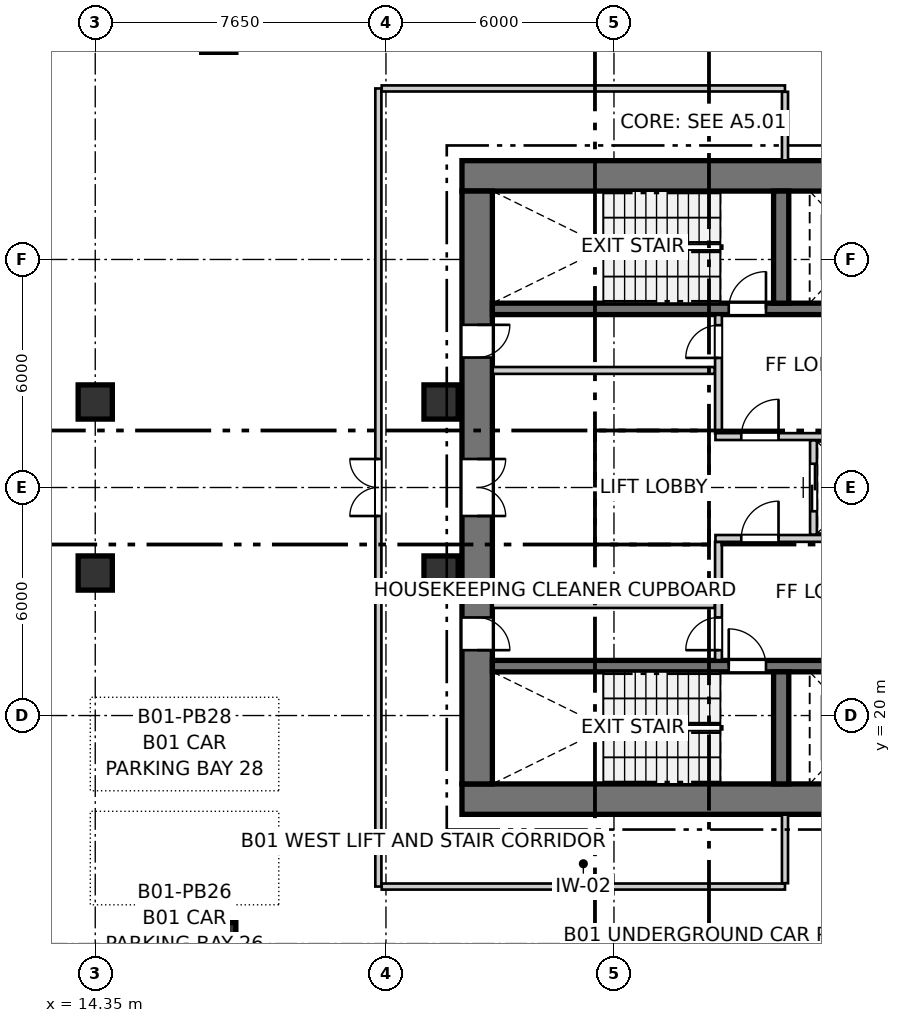
"""IFC4 building model, lengths in metres.
Left out: names, types, materials, properties, quantities, classifications, styles, units other than length and angle.
Written with IfcOpenShell. Run it as: python <this file> out.ifc"""

import sys

from ifc_helpers import new_model, si_unit, direction, frame, frame_2d, origin, origin_2d, place, context, subcontext, project, spatial, rectangle, extrude, source, transform, mapped, element, fill, save


model = new_model("IFC4")
c1 = context("Model", 3, precision=1e-05, world=origin(), true_north=direction((0.0, 1.0)))
c2 = subcontext(c1, "Body", "Model", "MODEL_VIEW")
j1 = project(units=[si_unit("LENGTHUNIT", "METRE"), si_unit("PLANEANGLEUNIT", "RADIAN")], contexts=[c1])
p1 = place(None, origin())
s1 = spatial("IfcSite", under=j1, at=p1, CompositionType="ELEMENT")
p2 = place(p1, origin())
s2 = spatial("IfcBuilding", under=s1, at=p2, CompositionType="ELEMENT")
p3 = place(p2, frame((0.0, 0.0, -4.2)))
s3 = spatial("IfcBuildingStorey", under=s2, at=p3, CompositionType="ELEMENT", Elevation=-4.2)
m1 = source(origin(), c2, "Body", "SweptSolid", [
    extrude(rectangle(XDim=0.9, YDim=0.9, at=origin_2d()), origin(), (0.0, 0.0, 1.0), 3.985),
])
p4 = place(p3, frame((14.35, 23.75, 0.0), z_axis=(0.0, 0.0, 1.0), x_axis=(1.0, 0.0, 0.0)))
e1 = element("IfcColumn", 1, at=p4, inside=s3, PredefinedType="COLUMN", context=c2, shape_type="MappedRepresentation", body=[
    mapped(m1, transform((0.0, 0.0, 0.0), x_axis=(1.0, 0.0, 0.0), y_axis=(0.0, 1.0, 0.0), z_axis=(0.0, 0.0, 1.0), scale=1.0)),
])
m2 = source(origin(), c2, "Body", "SweptSolid", [
    extrude(rectangle(XDim=0.9, YDim=0.9, at=origin_2d()), origin(), (0.0, 0.0, 1.0), 3.9),
])
p5 = place(p3, frame((23.45, 23.75, 0.0), z_axis=(0.0, 0.0, 1.0), x_axis=(1.0, 0.0, 0.0)))
e2 = element("IfcColumn", 2, at=p5, inside=s3, PredefinedType="COLUMN", context=c2, shape_type="MappedRepresentation", body=[
    mapped(m2, transform((0.0, 0.0, 0.0), x_axis=(1.0, 0.0, 0.0), y_axis=(0.0, 1.0, 0.0), z_axis=(0.0, 0.0, 1.0), scale=1.0)),
])
p6 = place(p3, frame((14.35, 28.25, 0.0), z_axis=(0.0, 0.0, 1.0), x_axis=(1.0, 0.0, 0.0)))
e3 = element("IfcColumn", 3, at=p6, inside=s3, PredefinedType="COLUMN", context=c2, shape_type="MappedRepresentation", body=[
    mapped(m1, transform((0.0, 0.0, 0.0), x_axis=(1.0, 0.0, 0.0), y_axis=(0.0, 1.0, 0.0), z_axis=(0.0, 0.0, 1.0), scale=1.0)),
])
for number, where, z_axis, x_axis in (
    (4, (23.45, 28.25, 0.0), (0.0, 0.0, 1.0), (1.0, 0.0, 0.0)),
    (5, (17.6, 14.1, 0.0), (0.0, 0.0, 1.0), (1.0, 0.0, 0.0)),
    (6, (17.6, 37.9, 0.0), (0.0, 0.0, 1.0), (1.0, 0.0, 0.0)),
):
    element("IfcColumn", number, at=place(p3, frame(where, z_axis=z_axis, x_axis=x_axis)), inside=s3, PredefinedType="COLUMN", context=c2, shape_type="MappedRepresentation", body=[
        mapped(m2, transform((0.0, 0.0, 0.0), x_axis=(1.0, 0.0, 0.0), y_axis=(0.0, 1.0, 0.0), z_axis=(0.0, 0.0, 1.0), scale=1.0)),
    ])
for number, where, z_axis, x_axis in (
    (7, (24.0, 17.8, 0.0), (0.0, 0.0, 1.0), (1.0, 0.0, 0.0)),
    (8, (36.7, 34.2, 0.0), (0.0, 0.0, 1.0), (-1.0, 0.0, 0.0)),
):
    element("IfcWall", number, at=place(p3, frame(where, z_axis=z_axis, x_axis=x_axis)), inside=s3, PredefinedType="SHEAR", context=c2, shape_type="SweptSolid", body=[
        extrude(rectangle(XDim=12.7, YDim=0.8, at=frame_2d((6.35, 0.0))), origin(), (0.0, 0.0, 1.0), 3.9),
    ])
p7 = place(p3, frame((24.4, 33.8, 0.0), z_axis=(0.0, 0.0, 1.0), x_axis=(0.0, -1.0, 0.0)))
e9 = element("IfcWall", 9, at=p7, inside=s3, PredefinedType="SHEAR", context=c2, shape_type="SweptSolid", body=[
    extrude(rectangle(XDim=15.6, YDim=0.8, at=frame_2d((7.8, 0.0))), origin(), (0.0, 0.0, 1.0), 3.9),
])
p8 = place(p7, frame((7.05, 0.0, 0.0)))
e10 = element("IfcOpeningElement", 10, at=p8, cuts=e9, PredefinedType="OPENING", context=c2, shape_type="SweptSolid", body=[
    extrude(rectangle(XDim=1.5, YDim=2.15, at=frame_2d((0.75, 1.075))), frame((0.0, 0.41, 0.0), z_axis=(0.0, -1.0, 0.0), x_axis=(1.0, 0.0, 0.0)), (0.0, 0.0, 1.0), 0.82),
])
p9 = place(p7, frame((3.52, 0.0, 0.0)))
e11 = element("IfcOpeningElement", 11, at=p9, cuts=e9, PredefinedType="OPENING", context=c2, shape_type="SweptSolid", body=[
    extrude(rectangle(XDim=0.86, YDim=2.05, at=frame_2d((0.43, 1.025))), frame((0.0, 0.41, 0.0), z_axis=(0.0, -1.0, 0.0), x_axis=(1.0, 0.0, 0.0)), (0.0, 0.0, 1.0), 0.82),
])
p10 = place(p7, frame((11.22, 0.0, 0.0)))
e12 = element("IfcOpeningElement", 12, at=p10, cuts=e9, PredefinedType="OPENING", context=c2, shape_type="SweptSolid", body=[
    extrude(rectangle(XDim=0.86, YDim=2.05, at=frame_2d((0.43, 1.025))), frame((0.0, 0.41, 0.0), z_axis=(0.0, -1.0, 0.0), x_axis=(1.0, 0.0, 0.0)), (0.0, 0.0, 1.0), 0.82),
])
p11 = place(p3, frame((24.8, 21.3, 0.0), z_axis=(0.0, 0.0, 1.0), x_axis=(1.0, 0.0, 0.0)))
e13 = element("IfcWall", 13, at=p11, inside=s3, PredefinedType="SHEAR", context=c2, shape_type="SweptSolid", body=[
    extrude(rectangle(XDim=11.1, YDim=0.3, at=frame_2d((5.55, 0.0))), origin(), (0.0, 0.0, 1.0), 3.9),
])
p12 = place(p11, frame((6.22, 0.0, 0.0)))
e14 = element("IfcOpeningElement", 14, at=p12, cuts=e13, PredefinedType="OPENING", context=c2, shape_type="SweptSolid", body=[
    extrude(rectangle(XDim=0.98, YDim=2.15, at=frame_2d((0.49, 1.075))), frame((0.0, 0.16, 0.0), z_axis=(0.0, -1.0, 0.0), x_axis=(1.0, 0.0, 0.0)), (0.0, 0.0, 1.0), 0.32),
])
p13 = place(p11, frame((9.15, 0.0, 0.0)))
e15 = element("IfcOpeningElement", 15, at=p13, cuts=e13, PredefinedType="OPENING", context=c2, shape_type="SweptSolid", body=[
    extrude(rectangle(XDim=1.15, YDim=2.15, at=frame_2d((0.575, 1.075))), frame((0.0, 0.16, 0.0), z_axis=(0.0, -1.0, 0.0), x_axis=(1.0, 0.0, 0.0)), (0.0, 0.0, 1.0), 0.32),
])
p14 = place(p3, frame((32.4, 18.2, 0.0), z_axis=(0.0, 0.0, 1.0), x_axis=(0.0, 1.0, 0.0)))
e16 = element("IfcWall", 16, at=p14, inside=s3, PredefinedType="SHEAR", context=c2, shape_type="SweptSolid", body=[
    extrude(rectangle(XDim=2.95, YDim=0.4, at=frame_2d((1.475, 0.0))), origin(), (0.0, 0.0, 1.0), 3.9),
])
p15 = place(p3, frame((24.8, 30.7, 0.0), z_axis=(0.0, 0.0, 1.0), x_axis=(1.0, 0.0, 0.0)))
e17 = element("IfcWall", 17, at=p15, inside=s3, PredefinedType="SHEAR", context=c2, shape_type="SweptSolid", body=[
    extrude(rectangle(XDim=11.1, YDim=0.3, at=frame_2d((5.55, 0.0))), origin(), (0.0, 0.0, 1.0), 3.9),
])
p16 = place(p15, frame((6.22, 0.0, 0.0)))
e18 = element("IfcOpeningElement", 18, at=p16, cuts=e17, PredefinedType="OPENING", context=c2, shape_type="SweptSolid", body=[
    extrude(rectangle(XDim=0.98, YDim=2.15, at=frame_2d((0.49, 1.075))), frame((0.0, 0.16, 0.0), z_axis=(0.0, -1.0, 0.0), x_axis=(1.0, 0.0, 0.0)), (0.0, 0.0, 1.0), 0.32),
])
p17 = place(p15, frame((9.15, 0.0, 0.0)))
e19 = element("IfcOpeningElement", 19, at=p17, cuts=e17, PredefinedType="OPENING", context=c2, shape_type="SweptSolid", body=[
    extrude(rectangle(XDim=1.15, YDim=2.15, at=frame_2d((0.575, 1.075))), frame((0.0, 0.16, 0.0), z_axis=(0.0, -1.0, 0.0), x_axis=(1.0, 0.0, 0.0)), (0.0, 0.0, 1.0), 0.32),
])
p18 = place(p3, frame((32.4, 30.85, 0.0), z_axis=(0.0, 0.0, 1.0), x_axis=(0.0, 1.0, 0.0)))
e20 = element("IfcWall", 20, at=p18, inside=s3, PredefinedType="SHEAR", context=c2, shape_type="SweptSolid", body=[
    extrude(rectangle(XDim=2.95, YDim=0.4, at=frame_2d((1.475, 0.0))), origin(), (0.0, 0.0, 1.0), 3.9),
])
p19 = place(p3, frame((30.75, 21.46, 0.0), z_axis=(0.0, 0.0, 1.0), x_axis=(0.0, 1.0, 0.0)))
e21 = element("IfcWall", 21, at=p19, inside=s3, PredefinedType="PARTITIONING", context=c2, shape_type="SweptSolid", body=[
    extrude(rectangle(XDim=3.11, YDim=0.18, at=frame_2d((1.555, 0.0))), origin(), (0.0, 0.0, 1.0), 3.9),
])
p20 = place(p19, frame((0.26, 0.0, 0.0)))
e22 = element("IfcOpeningElement", 22, at=p20, cuts=e21, PredefinedType="OPENING", context=c2, shape_type="SweptSolid", body=[
    extrude(rectangle(XDim=0.86, YDim=2.05, at=frame_2d((0.43, 1.025))), frame((0.0, 0.1, 0.0), z_axis=(0.0, -1.0, 0.0), x_axis=(1.0, 0.0, 0.0)), (0.0, 0.0, 1.0), 0.2),
])
p21 = place(p3, frame((30.67, 24.66, 0.0), z_axis=(0.0, 0.0, 1.0), x_axis=(1.0, 0.0, 0.0)))
e23 = element("IfcWall", 23, at=p21, inside=s3, PredefinedType="PARTITIONING", context=c2, shape_type="SweptSolid", body=[
    extrude(rectangle(XDim=5.22, YDim=0.18, at=frame_2d((2.61, 0.0))), origin(), (0.0, 0.0, 1.0), 3.9),
])
p22 = place(p21, frame((0.68, 0.0, 0.0)))
e24 = element("IfcOpeningElement", 24, at=p22, cuts=e23, PredefinedType="OPENING", context=c2, shape_type="SweptSolid", body=[
    extrude(rectangle(XDim=0.98, YDim=2.15, at=frame_2d((0.49, 1.075))), frame((0.0, 0.1, 0.0), z_axis=(0.0, -1.0, 0.0), x_axis=(1.0, 0.0, 0.0)), (0.0, 0.0, 1.0), 0.2),
])
p23 = place(p3, frame((30.75, 27.43, 0.0), z_axis=(0.0, 0.0, 1.0), x_axis=(0.0, 1.0, 0.0)))
e25 = element("IfcWall", 25, at=p23, inside=s3, PredefinedType="PARTITIONING", context=c2, shape_type="SweptSolid", body=[
    extrude(rectangle(XDim=3.11, YDim=0.18, at=frame_2d((1.555, 0.0))), origin(), (0.0, 0.0, 1.0), 3.9),
])
p24 = place(p23, frame((1.98, 0.0, 0.0)))
e26 = element("IfcOpeningElement", 26, at=p24, cuts=e25, PredefinedType="OPENING", context=c2, shape_type="SweptSolid", body=[
    extrude(rectangle(XDim=0.86, YDim=2.05, at=frame_2d((0.43, 1.025))), frame((0.0, 0.1, 0.0), z_axis=(0.0, -1.0, 0.0), x_axis=(1.0, 0.0, 0.0)), (0.0, 0.0, 1.0), 0.2),
])
p25 = place(p3, frame((30.67, 27.34, 0.0), z_axis=(0.0, 0.0, 1.0), x_axis=(1.0, 0.0, 0.0)))
e27 = element("IfcWall", 27, at=p25, inside=s3, PredefinedType="PARTITIONING", context=c2, shape_type="SweptSolid", body=[
    extrude(rectangle(XDim=5.22, YDim=0.18, at=frame_2d((2.61, 0.0))), origin(), (0.0, 0.0, 1.0), 3.9),
])
p26 = place(p25, frame((0.68, 0.0, 0.0)))
e28 = element("IfcOpeningElement", 28, at=p26, cuts=e27, PredefinedType="OPENING", context=c2, shape_type="SweptSolid", body=[
    extrude(rectangle(XDim=0.98, YDim=2.15, at=frame_2d((0.49, 1.075))), frame((0.0, 0.1, 0.0), z_axis=(0.0, -1.0, 0.0), x_axis=(1.0, 0.0, 0.0)), (0.0, 0.0, 1.0), 0.2),
])
p27 = place(p3, frame((33.25, 24.76, 0.0), z_axis=(0.0, 0.0, 1.0), x_axis=(0.0, 1.0, 0.0)))
e29 = element("IfcWall", 29, at=p27, inside=s3, PredefinedType="PARTITIONING", context=c2, shape_type="SweptSolid", body=[
    extrude(rectangle(XDim=2.48, YDim=0.18, at=frame_2d((1.24, 0.0))), origin(), (0.0, 0.0, 1.0), 3.9),
])
p28 = place(p27, frame((0.615, 0.0, 0.0)))
e30 = element("IfcOpeningElement", 30, at=p28, cuts=e29, PredefinedType="OPENING", context=c2, shape_type="SweptSolid", body=[
    extrude(rectangle(XDim=1.25, YDim=2.15, at=frame_2d((0.625, 1.075))), frame((0.0, 0.1, 0.0), z_axis=(0.0, -1.0, 0.0), x_axis=(1.0, 0.0, 0.0)), (0.0, 0.0, 1.0), 0.2),
])
for number, where, z_axis, x_axis in (
    (31, (24.81, 22.92, 0.0), (0.0, 0.0, 1.0), (1.0, 0.0, 0.0)),
    (32, (24.81, 29.08, 0.0), (0.0, 0.0, 1.0), (1.0, 0.0, 0.0)),
):
    element("IfcWall", number, at=place(p3, frame(where, z_axis=z_axis, x_axis=x_axis)), inside=s3, PredefinedType="PARTITIONING", context=c2, shape_type="SweptSolid", body=[
        extrude(rectangle(XDim=5.84, YDim=0.18, at=frame_2d((2.92, 0.0))), origin(), (0.0, 0.0, 1.0), 3.9),
    ])
p29 = place(p3, frame((21.8, 15.5, 0.0), z_axis=(0.0, 0.0, 1.0), x_axis=(0.0, 1.0, 0.0)))
e33 = element("IfcWall", 33, at=p29, inside=s3, PredefinedType="PARTITIONING", context=c2, shape_type="SweptSolid", body=[
    extrude(rectangle(XDim=21.0, YDim=0.16, at=frame_2d((10.5, 0.0))), origin(), (0.0, 0.0, 1.0), 3.9),
])
p30 = place(p29, frame((9.75, 0.0, 0.0)))
e34 = element("IfcOpeningElement", 34, at=p30, cuts=e33, PredefinedType="OPENING", context=c2, shape_type="SweptSolid", body=[
    extrude(rectangle(XDim=1.5, YDim=2.15, at=frame_2d((0.75, 1.075))), frame((0.0, 0.09, 0.0), z_axis=(0.0, -1.0, 0.0), x_axis=(1.0, 0.0, 0.0)), (0.0, 0.0, 1.0), 0.18),
])
p31 = place(p3, frame((21.888, 15.5, 0.0), z_axis=(0.0, 0.0, 1.0), x_axis=(1.0, 0.0, 0.0)))
e35 = element("IfcWall", 35, at=p31, inside=s3, PredefinedType="PARTITIONING", context=c2, shape_type="SweptSolid", body=[
    extrude(rectangle(XDim=10.612, YDim=0.16, at=frame_2d((5.306, 0.0))), origin(), (0.0, 0.0, 1.0), 3.9),
])
p32 = place(p3, frame((32.5, 15.588, 0.0), z_axis=(0.0, 0.0, 1.0), x_axis=(0.0, 1.0, 0.0)))
e36 = element("IfcWall", 36, at=p32, inside=s3, PredefinedType="PARTITIONING", context=c2, shape_type="SweptSolid", body=[
    extrude(rectangle(XDim=1.804, YDim=0.16, at=frame_2d((0.902, 0.0))), origin(), (0.0, 0.0, 1.0), 3.9),
])
p33 = place(p3, frame((21.888, 36.5, 0.0), z_axis=(0.0, 0.0, 1.0), x_axis=(1.0, 0.0, 0.0)))
e37 = element("IfcWall", 37, at=p33, inside=s3, PredefinedType="PARTITIONING", context=c2, shape_type="SweptSolid", body=[
    extrude(rectangle(XDim=10.612, YDim=0.16, at=frame_2d((5.306, 0.0))), origin(), (0.0, 0.0, 1.0), 3.9),
])
p34 = place(p3, frame((32.5, 34.608, 0.0), z_axis=(0.0, 0.0, 1.0), x_axis=(0.0, 1.0, 0.0)))
e38 = element("IfcWall", 38, at=p34, inside=s3, PredefinedType="PARTITIONING", context=c2, shape_type="SweptSolid", body=[
    extrude(rectangle(XDim=1.804, YDim=0.16, at=frame_2d((0.902, 0.0))), origin(), (0.0, 0.0, 1.0), 3.9),
])
m3 = source(origin(), c2, "Body", "SweptSolid", [
    extrude(rectangle(XDim=0.98, YDim=2.15, at=frame_2d((0.49, 1.075))), frame((0.0, 0.025, 0.0), z_axis=(0.0, -1.0, 0.0), x_axis=(1.0, 0.0, 0.0)), (0.0, 0.0, 1.0), 0.05),
])
p35 = place(p12, origin())
e39 = element("IfcDoor", 39, at=p35, inside=s3, OperationType="SINGLE_SWING_LEFT", PredefinedType="DOOR", context=c2, shape_type="MappedRepresentation", body=[
    mapped(m3, transform((0.0, 0.0, 0.0), x_axis=(1.0, 0.0, 0.0), y_axis=(0.0, 1.0, 0.0), z_axis=(0.0, 0.0, 1.0), scale=1.0)),
])
fill(e14, e39)
p36 = place(p16, origin())
e40 = element("IfcDoor", 40, at=p36, inside=s3, OperationType="SINGLE_SWING_RIGHT", PredefinedType="DOOR", context=c2, shape_type="MappedRepresentation", body=[
    mapped(m3, transform((0.0, 0.0, 0.0), x_axis=(1.0, 0.0, 0.0), y_axis=(0.0, 1.0, 0.0), z_axis=(0.0, 0.0, 1.0), scale=1.0)),
])
fill(e18, e40)
m4 = source(origin(), c2, "Body", "SweptSolid", [
    extrude(rectangle(XDim=1.5, YDim=2.15, at=frame_2d((0.75, 1.075))), frame((0.0, 0.025, 0.0), z_axis=(0.0, -1.0, 0.0), x_axis=(1.0, 0.0, 0.0)), (0.0, 0.0, 1.0), 0.05),
])
p37 = place(p8, origin())
e41 = element("IfcDoor", 41, at=p37, inside=s3, OperationType="DOUBLE_DOOR_SINGLE_SWING", PredefinedType="DOOR", context=c2, shape_type="MappedRepresentation", body=[
    mapped(m4, transform((0.0, 0.0, 0.0), x_axis=(1.0, 0.0, 0.0), y_axis=(0.0, 1.0, 0.0), z_axis=(0.0, 0.0, 1.0), scale=1.0)),
])
fill(e10, e41)
m5 = source(origin(), c2, "Body", "SweptSolid", [
    extrude(rectangle(XDim=0.86, YDim=2.05, at=frame_2d((0.43, 1.025))), frame((0.0, 0.025, 0.0), z_axis=(0.0, -1.0, 0.0), x_axis=(1.0, 0.0, 0.0)), (0.0, 0.0, 1.0), 0.05),
])
p38 = place(p9, origin())
e42 = element("IfcDoor", 42, at=p38, inside=s3, OperationType="SINGLE_SWING_LEFT", PredefinedType="DOOR", context=c2, shape_type="MappedRepresentation", body=[
    mapped(m5, transform((0.0, 0.0, 0.0), x_axis=(1.0, 0.0, 0.0), y_axis=(0.0, 1.0, 0.0), z_axis=(0.0, 0.0, 1.0), scale=1.0)),
])
fill(e11, e42)
p39 = place(p10, origin())
e43 = element("IfcDoor", 43, at=p39, inside=s3, OperationType="SINGLE_SWING_RIGHT", PredefinedType="DOOR", context=c2, shape_type="MappedRepresentation", body=[
    mapped(m5, transform((0.0, 0.0, 0.0), x_axis=(1.0, 0.0, 0.0), y_axis=(0.0, 1.0, 0.0), z_axis=(0.0, 0.0, 1.0), scale=1.0)),
])
fill(e12, e43)
p40 = place(p20, origin())
e44 = element("IfcDoor", 44, at=p40, inside=s3, OperationType="SINGLE_SWING_LEFT", PredefinedType="DOOR", context=c2, shape_type="MappedRepresentation", body=[
    mapped(m5, transform((0.0, 0.0, 0.0), x_axis=(1.0, 0.0, 0.0), y_axis=(0.0, 1.0, 0.0), z_axis=(0.0, 0.0, 1.0), scale=1.0)),
])
fill(e22, e44)
p41 = place(p22, origin())
e45 = element("IfcDoor", 45, at=p41, inside=s3, OperationType="SINGLE_SWING_RIGHT", PredefinedType="DOOR", context=c2, shape_type="MappedRepresentation", body=[
    mapped(m3, transform((0.0, 0.0, 0.0), x_axis=(1.0, 0.0, 0.0), y_axis=(0.0, 1.0, 0.0), z_axis=(0.0, 0.0, 1.0), scale=1.0)),
])
fill(e24, e45)
p42 = place(p24, origin())
e46 = element("IfcDoor", 46, at=p42, inside=s3, OperationType="SINGLE_SWING_LEFT", PredefinedType="DOOR", context=c2, shape_type="MappedRepresentation", body=[
    mapped(m5, transform((0.0, 0.0, 0.0), x_axis=(1.0, 0.0, 0.0), y_axis=(0.0, 1.0, 0.0), z_axis=(0.0, 0.0, 1.0), scale=1.0)),
])
fill(e26, e46)
p43 = place(p26, origin())
e47 = element("IfcDoor", 47, at=p43, inside=s3, OperationType="SINGLE_SWING_RIGHT", PredefinedType="DOOR", context=c2, shape_type="MappedRepresentation", body=[
    mapped(m3, transform((0.0, 0.0, 0.0), x_axis=(1.0, 0.0, 0.0), y_axis=(0.0, 1.0, 0.0), z_axis=(0.0, 0.0, 1.0), scale=1.0)),
])
fill(e28, e47)
m6 = source(origin(), c2, "Body", "SweptSolid", [
    extrude(rectangle(XDim=1.25, YDim=2.15, at=frame_2d((0.625, 1.075))), frame((0.0, 0.025, 0.0), z_axis=(0.0, -1.0, 0.0), x_axis=(1.0, 0.0, 0.0)), (0.0, 0.0, 1.0), 0.05),
])
p44 = place(p28, origin())
e48 = element("IfcDoor", 48, at=p44, inside=s3, OperationType="DOUBLE_DOOR_SLIDING", PredefinedType="DOOR", context=c2, shape_type="MappedRepresentation", body=[
    mapped(m6, transform((0.0, 0.0, 0.0), x_axis=(1.0, 0.0, 0.0), y_axis=(0.0, 1.0, 0.0), z_axis=(0.0, 0.0, 1.0), scale=1.0)),
])
fill(e30, e48)
p45 = place(p30, origin())
e49 = element("IfcDoor", 49, at=p45, inside=s3, OperationType="DOUBLE_DOOR_SINGLE_SWING", PredefinedType="DOOR", context=c2, shape_type="MappedRepresentation", body=[
    mapped(m4, transform((0.0, 0.0, 0.0), x_axis=(1.0, 0.0, 0.0), y_axis=(0.0, 1.0, 0.0), z_axis=(0.0, 0.0, 1.0), scale=1.0)),
])
fill(e34, e49)
save(model, sys.argv[1])
